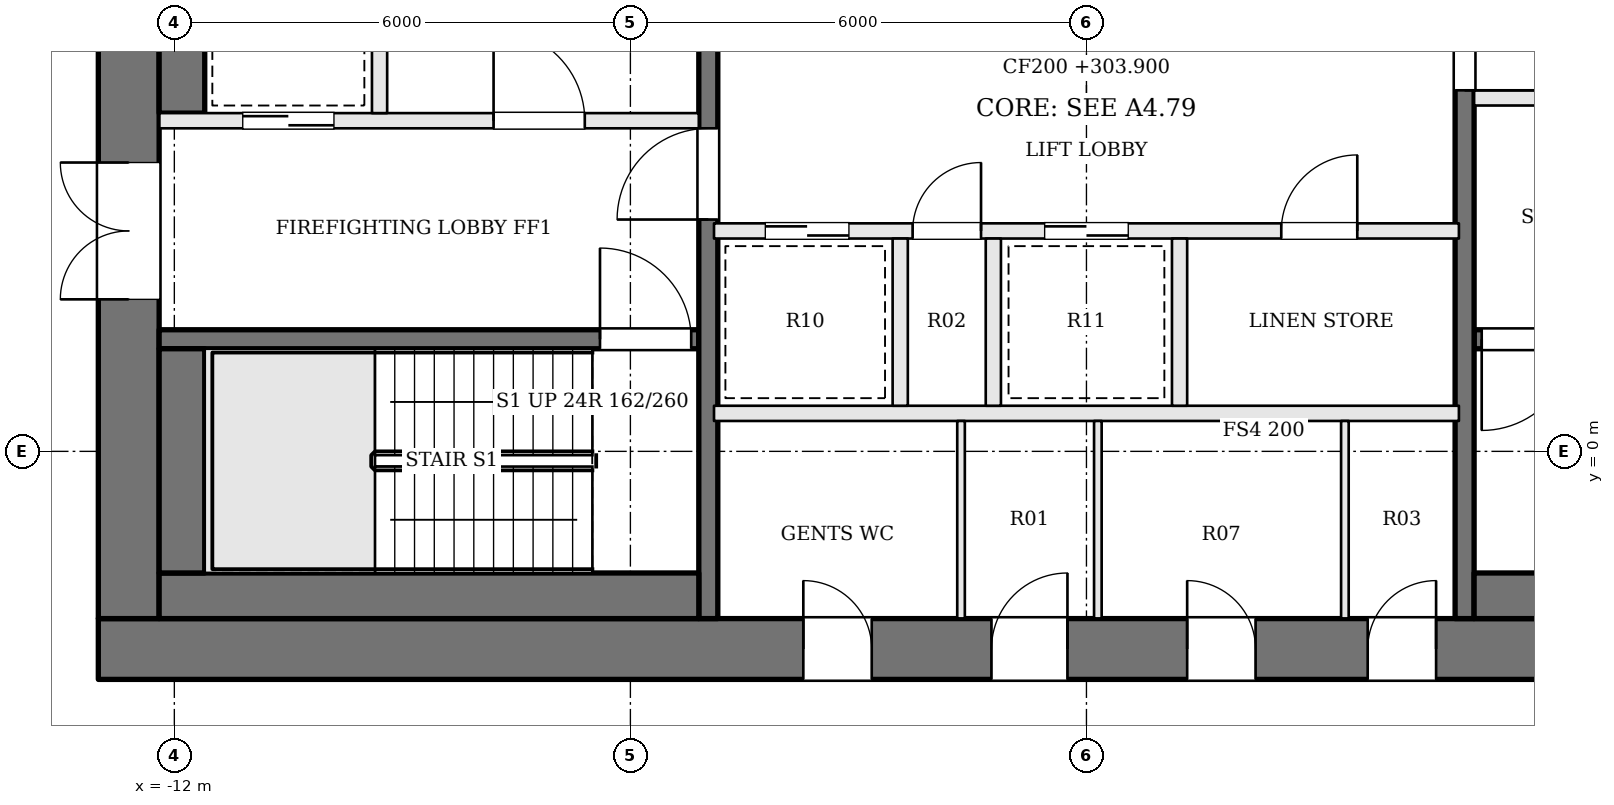
"""IFC4 building model, lengths in metres.
Left out: names, types, materials, properties, quantities, classifications, styles, units other than length and angle.
Written with IfcOpenShell. Run it as: python <this file> out.ifc"""

import sys

from ifc_helpers import new_model, si_unit, direction, frame, frame_2d, origin, place, context, subcontext, project, spatial, rectangle, extrude, element, fill, save


model = new_model("IFC4")
c1 = context("Model", 3, precision=1e-05, world=origin(), true_north=direction((0.0, 1.0)))
c2 = subcontext(c1, "Body", "Model", "MODEL_VIEW")
j1 = project(units=[si_unit("LENGTHUNIT", "METRE"), si_unit("PLANEANGLEUNIT", "RADIAN")], contexts=[c1])
p1 = place(None, origin())
s1 = spatial("IfcSite", under=j1, at=p1, CompositionType="ELEMENT")
p2 = place(p1, origin())
s2 = spatial("IfcBuilding", under=s1, at=p2, CompositionType="ELEMENT")
p3 = place(p2, frame((0.0, 0.0, 303.9)))
s3 = spatial("IfcBuildingStorey", under=s2, at=p3, CompositionType="ELEMENT", Elevation=303.9)
p4 = place(p3, frame((-13.0, -2.6, 0.0), z_axis=(0.0, 0.0, 1.0), x_axis=(1.0, 0.0, 0.0)))
e1 = element("IfcWall", 1, at=p4, inside=s3, PredefinedType="SHEAR", context=c2, shape_type="SweptSolid", body=[
    extrude(rectangle(XDim=26.0, YDim=0.8, at=frame_2d((13.0, 0.0))), origin(), (0.0, 0.0, 1.0), 3.9),
])
p5 = place(p4, frame((9.275, 0.0, 0.0)))
e2 = element("IfcOpeningElement", 2, at=p5, cuts=e1, PredefinedType="OPENING", context=c2, shape_type="SweptSolid", body=[
    extrude(rectangle(XDim=0.9, YDim=2.1, at=frame_2d((0.45, 1.05))), frame((0.0, 0.41, 0.0), z_axis=(0.0, -1.0, 0.0), x_axis=(1.0, 0.0, 0.0)), (0.0, 0.0, 1.0), 0.82),
])
p6 = place(p4, frame((11.75, 0.0, 0.0)))
e3 = element("IfcOpeningElement", 3, at=p6, cuts=e1, PredefinedType="OPENING", context=c2, shape_type="SweptSolid", body=[
    extrude(rectangle(XDim=1.0, YDim=2.1, at=frame_2d((0.5, 1.05))), frame((0.0, 0.41, 0.0), z_axis=(0.0, -1.0, 0.0), x_axis=(1.0, 0.0, 0.0)), (0.0, 0.0, 1.0), 0.82),
])
p7 = place(p4, frame((14.325, 0.0, 0.0)))
e4 = element("IfcOpeningElement", 4, at=p7, cuts=e1, PredefinedType="OPENING", context=c2, shape_type="SweptSolid", body=[
    extrude(rectangle(XDim=0.9, YDim=2.1, at=frame_2d((0.45, 1.05))), frame((0.0, 0.41, 0.0), z_axis=(0.0, -1.0, 0.0), x_axis=(1.0, 0.0, 0.0)), (0.0, 0.0, 1.0), 0.82),
])
p8 = place(p4, frame((16.7, 0.0, 0.0)))
e5 = element("IfcOpeningElement", 5, at=p8, cuts=e1, PredefinedType="OPENING", context=c2, shape_type="SweptSolid", body=[
    extrude(rectangle(XDim=0.9, YDim=2.1, at=frame_2d((0.45, 1.05))), frame((0.0, 0.41, 0.0), z_axis=(0.0, -1.0, 0.0), x_axis=(1.0, 0.0, 0.0)), (0.0, 0.0, 1.0), 0.82),
])
p9 = place(p3, frame((-12.6, -2.2, 0.0), z_axis=(0.0, 0.0, 1.0), x_axis=(0.0, 1.0, 0.0)))
e6 = element("IfcWall", 6, at=p9, inside=s3, PredefinedType="SHEAR", context=c2, shape_type="SweptSolid", body=[
    extrude(rectangle(XDim=13.4, YDim=0.8, at=frame_2d((6.7, 0.0))), origin(), (0.0, 0.0, 1.0), 3.9),
])
p10 = place(p9, frame((4.2, 0.0, 0.0)))
e7 = element("IfcOpeningElement", 7, at=p10, cuts=e6, PredefinedType="OPENING", context=c2, shape_type="SweptSolid", body=[
    extrude(rectangle(XDim=1.8, YDim=2.1, at=frame_2d((0.9, 1.05))), frame((0.0, 0.41, 0.0), z_axis=(0.0, -1.0, 0.0), x_axis=(1.0, 0.0, 0.0)), (0.0, 0.0, 1.0), 0.82),
])
p11 = place(p3, frame((-12.2, 1.475, 0.0), z_axis=(0.0, 0.0, 1.0), x_axis=(1.0, 0.0, 0.0)))
e8 = element("IfcWall", 8, at=p11, inside=s3, PredefinedType="SOLIDWALL", context=c2, shape_type="SweptSolid", body=[
    extrude(rectangle(XDim=7.1, YDim=0.25, at=frame_2d((3.55, 0.0))), origin(), (0.0, 0.0, 1.0), 3.7),
])
p12 = place(p11, frame((5.8, 0.0, 0.0)))
e9 = element("IfcOpeningElement", 9, at=p12, cuts=e8, PredefinedType="OPENING", context=c2, shape_type="SweptSolid", body=[
    extrude(rectangle(XDim=1.2, YDim=2.1, at=frame_2d((0.6, 1.05))), frame((0.0, 0.135, 0.0), z_axis=(0.0, -1.0, 0.0), x_axis=(1.0, 0.0, 0.0)), (0.0, 0.0, 1.0), 0.27),
])
p13 = place(p3, frame((-12.2, 4.35, 0.0), z_axis=(0.0, 0.0, 1.0), x_axis=(1.0, 0.0, 0.0)))
e10 = element("IfcWall", 10, at=p13, inside=s3, PredefinedType="SOLIDWALL", context=c2, shape_type="SweptSolid", body=[
    extrude(rectangle(XDim=7.1, YDim=0.2, at=frame_2d((3.55, 0.0))), origin(), (0.0, 0.0, 1.0), 3.7),
])
p14 = place(p13, frame((4.4, 0.0, 0.0)))
e11 = element("IfcOpeningElement", 11, at=p14, cuts=e10, PredefinedType="OPENING", context=c2, shape_type="SweptSolid", body=[
    extrude(rectangle(XDim=1.2, YDim=2.1, at=frame_2d((0.6, 1.05))), frame((0.0, 0.11, 0.0), z_axis=(0.0, -1.0, 0.0), x_axis=(1.0, 0.0, 0.0)), (0.0, 0.0, 1.0), 0.22),
])
p15 = place(p13, frame((1.1, 0.0, 0.0)))
e12 = element("IfcOpeningElement", 12, at=p15, cuts=e10, PredefinedType="OPENING", context=c2, shape_type="SweptSolid", body=[
    extrude(rectangle(XDim=1.2, YDim=2.1, at=frame_2d((0.6, 1.05))), frame((0.0, 0.11, 0.0), z_axis=(0.0, -1.0, 0.0), x_axis=(1.0, 0.0, 0.0)), (0.0, 0.0, 1.0), 0.22),
])
p16 = place(p3, frame((12.2, 4.65, 0.0), z_axis=(0.0, 0.0, 1.0), x_axis=(-1.0, 0.0, 0.0)))
e13 = element("IfcWall", 13, at=p16, inside=s3, PredefinedType="SOLIDWALL", context=c2, shape_type="SweptSolid", body=[
    extrude(rectangle(XDim=7.1, YDim=0.2, at=frame_2d((3.55, 0.0))), origin(), (0.0, 0.0, 1.0), 3.7),
])
p17 = place(p16, frame((4.4, 0.0, 0.0)))
e14 = element("IfcOpeningElement", 14, at=p17, cuts=e13, PredefinedType="OPENING", context=c2, shape_type="SweptSolid", body=[
    extrude(rectangle(XDim=1.2, YDim=2.1, at=frame_2d((0.6, 1.05))), frame((0.0, 0.11, 0.0), z_axis=(0.0, -1.0, 0.0), x_axis=(1.0, 0.0, 0.0)), (0.0, 0.0, 1.0), 0.22),
])
p18 = place(p16, frame((1.1, 0.0, 0.0)))
e15 = element("IfcOpeningElement", 15, at=p18, cuts=e13, PredefinedType="OPENING", context=c2, shape_type="SweptSolid", body=[
    extrude(rectangle(XDim=1.2, YDim=2.1, at=frame_2d((0.6, 1.05))), frame((0.0, 0.11, 0.0), z_axis=(0.0, -1.0, 0.0), x_axis=(1.0, 0.0, 0.0)), (0.0, 0.0, 1.0), 0.22),
])
p19 = place(p3, frame((12.2, 1.475, 0.0), z_axis=(0.0, 0.0, 1.0), x_axis=(-1.0, 0.0, 0.0)))
e16 = element("IfcWall", 16, at=p19, inside=s3, PredefinedType="SOLIDWALL", context=c2, shape_type="SweptSolid", body=[
    extrude(rectangle(XDim=7.1, YDim=0.25, at=frame_2d((3.55, 0.0))), origin(), (0.0, 0.0, 1.0), 3.7),
])
p20 = place(p19, frame((5.8, 0.0, 0.0)))
e17 = element("IfcOpeningElement", 17, at=p20, cuts=e16, PredefinedType="OPENING", context=c2, shape_type="SweptSolid", body=[
    extrude(rectangle(XDim=1.2, YDim=2.1, at=frame_2d((0.6, 1.05))), frame((0.0, 0.135, 0.0), z_axis=(0.0, -1.0, 0.0), x_axis=(1.0, 0.0, 0.0)), (0.0, 0.0, 1.0), 0.27),
])
p21 = place(p3, frame((-9.3, 4.45, 0.0), z_axis=(0.0, 0.0, 1.0), x_axis=(0.0, 1.0, 0.0)))
e18 = element("IfcWall", 18, at=p21, inside=s3, PredefinedType="SOLIDWALL", context=c2, shape_type="SweptSolid", body=[
    extrude(rectangle(XDim=3.0, YDim=0.2, at=frame_2d((1.5, 0.0))), origin(), (0.0, 0.0, 1.0), 3.7),
])
p22 = place(p3, frame((-4.975, -2.2, 0.0), z_axis=(0.0, 0.0, 1.0), x_axis=(0.0, 1.0, 0.0)))
e19 = element("IfcWall", 19, at=p22, inside=s3, PredefinedType="SOLIDWALL", context=c2, shape_type="SweptSolid", body=[
    extrude(rectangle(XDim=13.4, YDim=0.25, at=frame_2d((6.7, 0.0))), origin(), (0.0, 0.0, 1.0), 3.7),
])
p23 = place(p22, frame((5.25, 0.0, 0.0)))
e20 = element("IfcOpeningElement", 20, at=p23, cuts=e19, PredefinedType="OPENING", context=c2, shape_type="SweptSolid", body=[
    extrude(rectangle(XDim=1.2, YDim=2.1, at=frame_2d((0.6, 1.05))), frame((0.0, 0.135, 0.0), z_axis=(0.0, -1.0, 0.0), x_axis=(1.0, 0.0, 0.0)), (0.0, 0.0, 1.0), 0.27),
])
p24 = place(p3, frame((4.975, 11.2, 0.0), z_axis=(0.0, 0.0, 1.0), x_axis=(0.0, -1.0, 0.0)))
e21 = element("IfcWall", 21, at=p24, inside=s3, PredefinedType="SOLIDWALL", context=c2, shape_type="SweptSolid", body=[
    extrude(rectangle(XDim=13.4, YDim=0.25, at=frame_2d((6.7, 0.0))), origin(), (0.0, 0.0, 1.0), 3.7),
])
p25 = place(p24, frame((5.25, 0.0, 0.0)))
e22 = element("IfcOpeningElement", 22, at=p25, cuts=e21, PredefinedType="OPENING", context=c2, shape_type="SweptSolid", body=[
    extrude(rectangle(XDim=1.2, YDim=2.1, at=frame_2d((0.6, 1.05))), frame((0.0, 0.135, 0.0), z_axis=(0.0, -1.0, 0.0), x_axis=(1.0, 0.0, 0.0)), (0.0, 0.0, 1.0), 0.27),
])
p26 = place(p3, frame((-12.2, -1.9, 0.0), z_axis=(0.0, 0.0, 1.0), x_axis=(1.0, 0.0, 0.0)))
e23 = element("IfcWall", 23, at=p26, inside=s3, PredefinedType="SOLIDWALL", context=c2, shape_type="SweptSolid", body=[
    extrude(rectangle(XDim=7.1, YDim=0.6, at=frame_2d((3.55, 0.0))), origin(), (0.0, 0.0, 1.0), 3.7),
])
p27 = place(p3, frame((-11.9, -1.6, 0.0), z_axis=(0.0, 0.0, 1.0), x_axis=(0.0, 1.0, 0.0)))
e24 = element("IfcWall", 24, at=p27, inside=s3, PredefinedType="SOLIDWALL", context=c2, shape_type="SweptSolid", body=[
    extrude(rectangle(XDim=2.95, YDim=0.6, at=frame_2d((1.475, 0.0))), origin(), (0.0, 0.0, 1.0), 3.7),
])
p28 = place(p3, frame((-11.9, 4.45, 0.0), z_axis=(0.0, 0.0, 1.0), x_axis=(0.0, 1.0, 0.0)))
e25 = element("IfcWall", 25, at=p28, inside=s3, PredefinedType="SOLIDWALL", context=c2, shape_type="SweptSolid", body=[
    extrude(rectangle(XDim=3.0, YDim=0.6, at=frame_2d((1.5, 0.0))), origin(), (0.0, 0.0, 1.0), 3.7),
])
p29 = place(p3, frame((12.2, -1.9, 0.0), z_axis=(0.0, 0.0, 1.0), x_axis=(-1.0, 0.0, 0.0)))
e26 = element("IfcWall", 26, at=p29, inside=s3, PredefinedType="SOLIDWALL", context=c2, shape_type="SweptSolid", body=[
    extrude(rectangle(XDim=7.1, YDim=0.6, at=frame_2d((3.55, 0.0))), origin(), (0.0, 0.0, 1.0), 3.7),
])
p30 = place(p3, frame((-4.9, 0.5, 0.0), z_axis=(0.0, 0.0, 1.0), x_axis=(1.0, 0.0, 0.0)))
e27 = element("IfcWall", 27, at=p30, inside=s3, PredefinedType="SOLIDWALL", context=c2, shape_type="SweptSolid", body=[
    extrude(rectangle(XDim=9.8, YDim=0.2, at=frame_2d((4.9, 0.0))), origin(), (0.0, 0.0, 1.0), 3.7),
])
p31 = place(p3, frame((-4.9, 2.9, 0.0), z_axis=(0.0, 0.0, 1.0), x_axis=(1.0, 0.0, 0.0)))
e28 = element("IfcWall", 28, at=p31, inside=s3, PredefinedType="SOLIDWALL", context=c2, shape_type="SweptSolid", body=[
    extrude(rectangle(XDim=9.8, YDim=0.2, at=frame_2d((4.9, 0.0))), origin(), (0.0, 0.0, 1.0), 3.7),
])
p32 = place(p31, frame((0.675, 0.0, 0.0)))
e29 = element("IfcOpeningElement", 29, at=p32, cuts=e28, PredefinedType="OPENING", context=c2, shape_type="SweptSolid", body=[
    extrude(rectangle(XDim=1.1, YDim=2.1, at=frame_2d((0.55, 1.05))), frame((0.0, 0.11, 0.0), z_axis=(0.0, -1.0, 0.0), x_axis=(1.0, 0.0, 0.0)), (0.0, 0.0, 1.0), 0.22),
])
p33 = place(p31, frame((2.613, 0.0, 0.0)))
e30 = element("IfcOpeningElement", 30, at=p33, cuts=e28, PredefinedType="OPENING", context=c2, shape_type="SweptSolid", body=[
    extrude(rectangle(XDim=0.9, YDim=2.1, at=frame_2d((0.45, 1.05))), frame((0.0, 0.11, 0.0), z_axis=(0.0, -1.0, 0.0), x_axis=(1.0, 0.0, 0.0)), (0.0, 0.0, 1.0), 0.22),
])
p34 = place(p31, frame((4.35, 0.0, 0.0)))
e31 = element("IfcOpeningElement", 31, at=p34, cuts=e28, PredefinedType="OPENING", context=c2, shape_type="SweptSolid", body=[
    extrude(rectangle(XDim=1.1, YDim=2.1, at=frame_2d((0.55, 1.05))), frame((0.0, 0.11, 0.0), z_axis=(0.0, -1.0, 0.0), x_axis=(1.0, 0.0, 0.0)), (0.0, 0.0, 1.0), 0.22),
])
p35 = place(p31, frame((7.463, 0.0, 0.0)))
e32 = element("IfcOpeningElement", 32, at=p35, cuts=e28, PredefinedType="OPENING", context=c2, shape_type="SweptSolid", body=[
    extrude(rectangle(XDim=1.0, YDim=2.1, at=frame_2d((0.5, 1.05))), frame((0.0, 0.11, 0.0), z_axis=(0.0, -1.0, 0.0), x_axis=(1.0, 0.0, 0.0)), (0.0, 0.0, 1.0), 0.22),
])
for number, where, z_axis, x_axis in (
    (33, (-2.45, 0.6, 0.0), (0.0, 0.0, 1.0), (0.0, 1.0, 0.0)),
    (34, (-1.225, 0.6, 0.0), (0.0, 0.0, 1.0), (0.0, 1.0, 0.0)),
    (35, (1.225, 0.6, 0.0), (0.0, 0.0, 1.0), (0.0, 1.0, 0.0)),
):
    element("IfcWall", number, at=place(p3, frame(where, z_axis=z_axis, x_axis=x_axis)), inside=s3, PredefinedType="SOLIDWALL", context=c2, shape_type="SweptSolid", body=[
        extrude(rectangle(XDim=2.2, YDim=0.2, at=frame_2d((1.1, 0.0))), origin(), (0.0, 0.0, 1.0), 3.7),
    ])
for number, where, z_axis, x_axis in (
    (36, (-1.65, -2.2, 0.0), (0.0, 0.0, 1.0), (0.0, 1.0, 0.0)),
    (37, (0.15, -2.2, 0.0), (0.0, 0.0, 1.0), (0.0, 1.0, 0.0)),
    (38, (3.4, -2.2, 0.0), (0.0, 0.0, 1.0), (0.0, 1.0, 0.0)),
):
    element("IfcWall", number, at=place(p3, frame(where, z_axis=z_axis, x_axis=x_axis)), inside=s3, PredefinedType="PARTITIONING", context=c2, shape_type="SweptSolid", body=[
        extrude(rectangle(XDim=2.6, YDim=0.1, at=frame_2d((1.3, 0.0))), origin(), (0.0, 0.0, 1.0), 3.7),
    ])
p36 = place(p10, origin())
e39 = element("IfcDoor", 39, at=p36, inside=s3, OperationType="DOUBLE_DOOR_SINGLE_SWING", PredefinedType="DOOR", context=c2, shape_type="SweptSolid", body=[
    extrude(rectangle(XDim=1.8, YDim=2.1, at=frame_2d((0.9, 1.05))), frame((0.0, 0.025, 0.0), z_axis=(0.0, -1.0, 0.0), x_axis=(1.0, 0.0, 0.0)), (0.0, 0.0, 1.0), 0.05),
])
fill(e7, e39)
p37 = place(p23, origin())
e40 = element("IfcDoor", 40, at=p37, inside=s3, OperationType="SINGLE_SWING_LEFT", PredefinedType="DOOR", context=c2, shape_type="SweptSolid", body=[
    extrude(rectangle(XDim=1.2, YDim=2.1, at=frame_2d((0.6, 1.05))), frame((0.0, 0.025, 0.0), z_axis=(0.0, -1.0, 0.0), x_axis=(1.0, 0.0, 0.0)), (0.0, 0.0, 1.0), 0.05),
])
fill(e20, e40)
p38 = place(p25, origin())
e41 = element("IfcDoor", 41, at=p38, inside=s3, OperationType="SINGLE_SWING_RIGHT", PredefinedType="DOOR", context=c2, shape_type="SweptSolid", body=[
    extrude(rectangle(XDim=1.2, YDim=2.1, at=frame_2d((0.6, 1.05))), frame((0.0, 0.025, 0.0), z_axis=(0.0, -1.0, 0.0), x_axis=(1.0, 0.0, 0.0)), (0.0, 0.0, 1.0), 0.05),
])
fill(e22, e41)
p39 = place(p14, origin())
e42 = element("IfcDoor", 42, at=p39, inside=s3, OperationType="SINGLE_SWING_LEFT", PredefinedType="DOOR", context=c2, shape_type="SweptSolid", body=[
    extrude(rectangle(XDim=1.2, YDim=2.1, at=frame_2d((0.6, 1.05))), frame((0.0, 0.025, 0.0), z_axis=(0.0, -1.0, 0.0), x_axis=(1.0, 0.0, 0.0)), (0.0, 0.0, 1.0), 0.05),
])
fill(e11, e42)
p40 = place(p12, origin())
e43 = element("IfcDoor", 43, at=p40, inside=s3, OperationType="SINGLE_SWING_LEFT", PredefinedType="DOOR", context=c2, shape_type="SweptSolid", body=[
    extrude(rectangle(XDim=1.2, YDim=2.1, at=frame_2d((0.6, 1.05))), frame((0.0, 0.025, 0.0), z_axis=(0.0, -1.0, 0.0), x_axis=(1.0, 0.0, 0.0)), (0.0, 0.0, 1.0), 0.05),
])
fill(e9, e43)
p41 = place(p20, origin())
e44 = element("IfcDoor", 44, at=p41, inside=s3, OperationType="SINGLE_SWING_RIGHT", PredefinedType="DOOR", context=c2, shape_type="SweptSolid", body=[
    extrude(rectangle(XDim=1.2, YDim=2.1, at=frame_2d((0.6, 1.05))), frame((0.0, 0.025, 0.0), z_axis=(0.0, -1.0, 0.0), x_axis=(1.0, 0.0, 0.0)), (0.0, 0.0, 1.0), 0.05),
])
fill(e17, e44)
p42 = place(p15, origin())
e45 = element("IfcDoor", 45, at=p42, inside=s3, OperationType="SLIDING_TO_RIGHT", PredefinedType="DOOR", context=c2, shape_type="SweptSolid", body=[
    extrude(rectangle(XDim=1.2, YDim=2.1, at=frame_2d((0.6, 1.05))), frame((0.0, 0.025, 0.0), z_axis=(0.0, -1.0, 0.0), x_axis=(1.0, 0.0, 0.0)), (0.0, 0.0, 1.0), 0.05),
])
fill(e12, e45)
p43 = place(p32, origin())
e46 = element("IfcDoor", 46, at=p43, inside=s3, OperationType="SLIDING_TO_RIGHT", PredefinedType="DOOR", context=c2, shape_type="SweptSolid", body=[
    extrude(rectangle(XDim=1.1, YDim=2.1, at=frame_2d((0.55, 1.05))), frame((0.0, 0.025, 0.0), z_axis=(0.0, -1.0, 0.0), x_axis=(1.0, 0.0, 0.0)), (0.0, 0.0, 1.0), 0.05),
])
fill(e29, e46)
p44 = place(p33, origin())
e47 = element("IfcDoor", 47, at=p44, inside=s3, OperationType="SINGLE_SWING_RIGHT", PredefinedType="DOOR", context=c2, shape_type="SweptSolid", body=[
    extrude(rectangle(XDim=0.9, YDim=2.1, at=frame_2d((0.45, 1.05))), frame((0.0, 0.025, 0.0), z_axis=(0.0, -1.0, 0.0), x_axis=(1.0, 0.0, 0.0)), (0.0, 0.0, 1.0), 0.05),
])
fill(e30, e47)
p45 = place(p34, origin())
e48 = element("IfcDoor", 48, at=p45, inside=s3, OperationType="SLIDING_TO_LEFT", PredefinedType="DOOR", context=c2, shape_type="SweptSolid", body=[
    extrude(rectangle(XDim=1.1, YDim=2.1, at=frame_2d((0.55, 1.05))), frame((0.0, 0.025, 0.0), z_axis=(0.0, -1.0, 0.0), x_axis=(1.0, 0.0, 0.0)), (0.0, 0.0, 1.0), 0.05),
])
fill(e31, e48)
p46 = place(p35, origin())
e49 = element("IfcDoor", 49, at=p46, inside=s3, OperationType="SINGLE_SWING_RIGHT", PredefinedType="DOOR", context=c2, shape_type="SweptSolid", body=[
    extrude(rectangle(XDim=1.0, YDim=2.1, at=frame_2d((0.5, 1.05))), frame((0.0, 0.025, 0.0), z_axis=(0.0, -1.0, 0.0), x_axis=(1.0, 0.0, 0.0)), (0.0, 0.0, 1.0), 0.05),
])
fill(e32, e49)
p47 = place(p5, origin())
e50 = element("IfcDoor", 50, at=p47, inside=s3, OperationType="SINGLE_SWING_LEFT", PredefinedType="DOOR", context=c2, shape_type="SweptSolid", body=[
    extrude(rectangle(XDim=0.9, YDim=2.1, at=frame_2d((0.45, 1.05))), frame((0.0, 0.025, 0.0), z_axis=(0.0, -1.0, 0.0), x_axis=(1.0, 0.0, 0.0)), (0.0, 0.0, 1.0), 0.05),
])
fill(e2, e50)
p48 = place(p6, origin())
e51 = element("IfcDoor", 51, at=p48, inside=s3, OperationType="SINGLE_SWING_RIGHT", PredefinedType="DOOR", context=c2, shape_type="SweptSolid", body=[
    extrude(rectangle(XDim=1.0, YDim=2.1, at=frame_2d((0.5, 1.05))), frame((0.0, 0.025, 0.0), z_axis=(0.0, -1.0, 0.0), x_axis=(1.0, 0.0, 0.0)), (0.0, 0.0, 1.0), 0.05),
])
fill(e3, e51)
p49 = place(p7, origin())
e52 = element("IfcDoor", 52, at=p49, inside=s3, OperationType="SINGLE_SWING_LEFT", PredefinedType="DOOR", context=c2, shape_type="SweptSolid", body=[
    extrude(rectangle(XDim=0.9, YDim=2.1, at=frame_2d((0.45, 1.05))), frame((0.0, 0.025, 0.0), z_axis=(0.0, -1.0, 0.0), x_axis=(1.0, 0.0, 0.0)), (0.0, 0.0, 1.0), 0.05),
])
fill(e4, e52)
p50 = place(p8, origin())
e53 = element("IfcDoor", 53, at=p50, inside=s3, OperationType="SINGLE_SWING_RIGHT", PredefinedType="DOOR", context=c2, shape_type="SweptSolid", body=[
    extrude(rectangle(XDim=0.9, YDim=2.1, at=frame_2d((0.45, 1.05))), frame((0.0, 0.025, 0.0), z_axis=(0.0, -1.0, 0.0), x_axis=(1.0, 0.0, 0.0)), (0.0, 0.0, 1.0), 0.05),
])
fill(e5, e53)
save(model, sys.argv[1])
